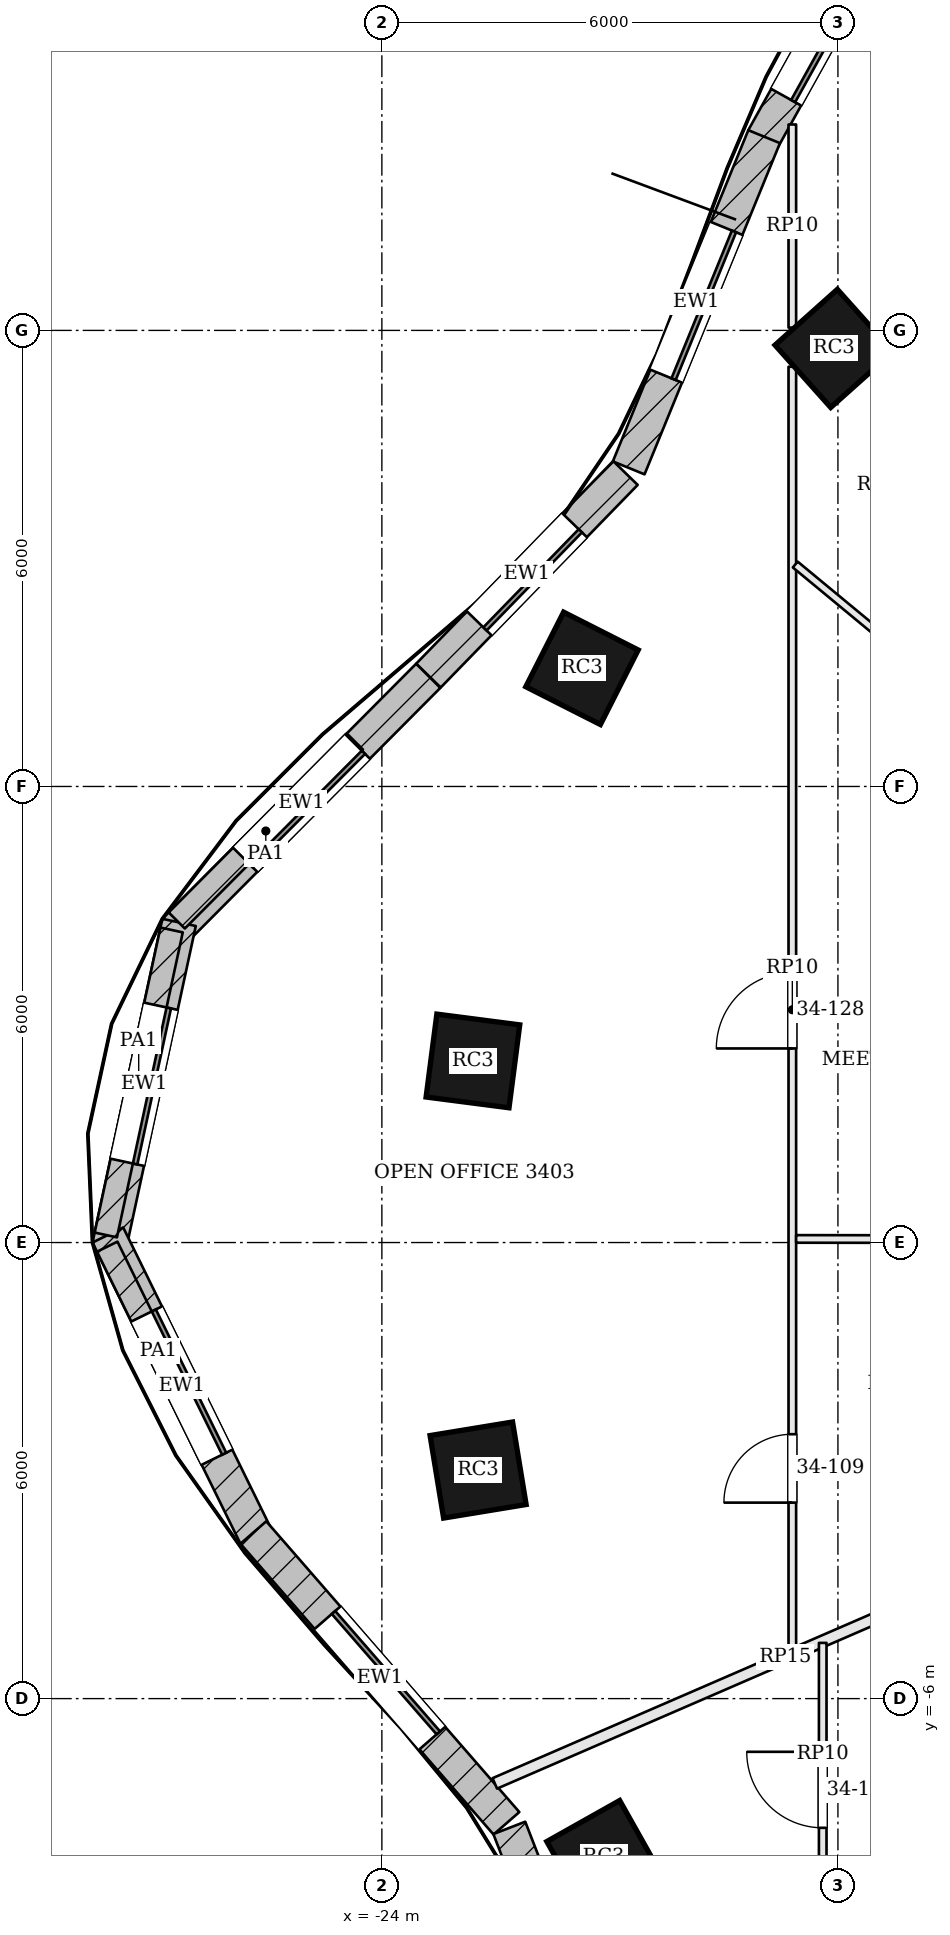
"""IFC4 building model, lengths in metres.
Left out: names, types, materials, properties, quantities, classifications, styles, units other than length and angle.
Written with IfcOpenShell. Run it as: python <this file> out.ifc"""

import sys

from ifc_helpers import new_model, si_unit, direction, frame, frame_2d, origin, origin_2d, place, context, subcontext, project, spatial, rectangle, extrude, element, fill, save


model = new_model("IFC4")
c1 = context("Model", 3, precision=1e-05, world=origin(), true_north=direction((0.0, 1.0)))
c2 = subcontext(c1, "Body", "Model", "MODEL_VIEW")
j1 = project(units=[si_unit("LENGTHUNIT", "METRE"), si_unit("PLANEANGLEUNIT", "RADIAN")], contexts=[c1])
p1 = place(None, origin())
s1 = spatial("IfcSite", under=j1, at=p1, CompositionType="ELEMENT")
p2 = place(p1, origin())
s2 = spatial("IfcBuilding", under=s1, at=p2, CompositionType="ELEMENT")
p3 = place(p2, frame((0.0, 0.0, 142.2)))
s3 = spatial("IfcBuildingStorey", under=s2, at=p3, CompositionType="ELEMENT", Elevation=142.2)
for number, where, z_axis, x_axis in (
    (1, (-18.051, 11.763, 0.0), (0.0, 0.0, 1.0), (-0.746, -0.666, 0.0)),
    (2, (-21.367, 7.554, 0.0), (0.0, 0.0, 1.0), (-0.452, -0.892, 0.0)),
    (3, (-22.802, 2.389, 0.0), (0.0, 0.0, 1.0), (-0.129, -0.992, 0.0)),
    (4, (-22.734, -2.993, 0.0), (0.0, 0.0, 1.0), (0.162, -0.987, 0.0)),
    (5, (-21.081, -8.09, 0.0), (0.0, 0.0, 1.0), (0.49, -0.872, 0.0)),
):
    element("IfcColumn", number, at=place(p3, frame(where, z_axis=z_axis, x_axis=x_axis)), inside=s3, PredefinedType="COLUMN", context=c2, shape_type="SweptSolid", body=[
        extrude(rectangle(XDim=1.1, YDim=1.1, at=origin_2d()), origin(), (0.0, 0.0, 1.0), 3.9),
    ])
p4 = place(p3, frame((-17.359, 17.447, 0.0), z_axis=(0.0, 0.0, 1.0), x_axis=(-0.485618126214, -0.874171056197, 0.0)))
e6 = element("IfcWall", 6, at=p4, inside=s3, PredefinedType="SOLIDWALL", context=c2, shape_type="SweptSolid", body=[
    extrude(rectangle(XDim=3.343, YDim=0.45, at=frame_2d((1.671, 0.0))), origin(), (0.0, 0.0, 1.0), 3.7),
])
p5 = place(p4, frame((0.621, 0.0, 0.9)))
e7 = element("IfcOpeningElement", 7, at=p5, cuts=e6, PredefinedType="OPENING", context=c2, shape_type="SweptSolid", body=[
    extrude(rectangle(XDim=2.1, YDim=2.3, at=frame_2d((1.05, 1.15))), frame((0.0, 0.235, 0.0), z_axis=(0.0, -1.0, 0.0), x_axis=(1.0, 0.0, 0.0)), (0.0, 0.0, 1.0), 0.47),
])
p6 = place(p3, frame((-18.971, 14.549, 0.0), z_axis=(0.0, 0.0, 1.0), x_axis=(-0.378434936431, -0.925627894398, 0.0)))
e8 = element("IfcWall", 8, at=p6, inside=s3, PredefinedType="SOLIDWALL", context=c2, shape_type="SweptSolid", body=[
    extrude(rectangle(XDim=4.708, YDim=0.45, at=frame_2d((2.354, 0.0))), origin(), (0.0, 0.0, 1.0), 3.7),
])
p7 = place(p6, frame((1.304, 0.0, 0.9)))
e9 = element("IfcOpeningElement", 9, at=p7, cuts=e8, PredefinedType="OPENING", context=c2, shape_type="SweptSolid", body=[
    extrude(rectangle(XDim=2.1, YDim=2.3, at=frame_2d((1.05, 1.15))), frame((0.0, 0.235, 0.0), z_axis=(0.0, -1.0, 0.0), x_axis=(1.0, 0.0, 0.0)), (0.0, 0.0, 1.0), 0.47),
])
p8 = place(p3, frame((-20.796, 10.124, 0.0), z_axis=(0.0, 0.0, 1.0), x_axis=(-0.697121527554, -0.716952980203, 0.0)))
e10 = element("IfcWall", 10, at=p8, inside=s3, PredefinedType="SOLIDWALL", context=c2, shape_type="SweptSolid", body=[
    extrude(rectangle(XDim=3.718, YDim=0.45, at=frame_2d((1.859, 0.0))), origin(), (0.0, 0.0, 1.0), 3.7),
])
p9 = place(p8, frame((0.959, 0.0, 0.9)))
e11 = element("IfcOpeningElement", 11, at=p9, cuts=e10, PredefinedType="OPENING", context=c2, shape_type="SweptSolid", body=[
    extrude(rectangle(XDim=1.8, YDim=2.3, at=frame_2d((0.9, 1.15))), frame((0.0, 0.235, 0.0), z_axis=(0.0, -1.0, 0.0), x_axis=(1.0, 0.0, 0.0)), (0.0, 0.0, 1.0), 0.47),
])
p10 = place(p3, frame((-23.39, 7.456, 0.0), z_axis=(0.0, 0.0, 1.0), x_axis=(-0.705349231702, -0.708859973011, 0.0)))
e12 = element("IfcWall", 12, at=p10, inside=s3, PredefinedType="SOLIDWALL", context=c2, shape_type="SweptSolid", body=[
    extrude(rectangle(XDim=4.729, YDim=0.45, at=frame_2d((2.364, 0.0))), origin(), (0.0, 0.0, 1.0), 3.7),
])
p11 = place(p10, frame((1.314, 0.0, 0.9)))
e13 = element("IfcOpeningElement", 13, at=p11, cuts=e12, PredefinedType="OPENING", context=c2, shape_type="SweptSolid", body=[
    extrude(rectangle(XDim=2.1, YDim=2.3, at=frame_2d((1.05, 1.15))), frame((0.0, 0.235, 0.0), z_axis=(0.0, -1.0, 0.0), x_axis=(1.0, 0.0, 0.0)), (0.0, 0.0, 1.0), 0.47),
])
p12 = place(p3, frame((-26.668, 4.211, 0.0), z_axis=(0.0, 0.0, 1.0), x_axis=(-0.210910311825, -0.977505417052, 0.0)))
e14 = element("IfcWall", 14, at=p12, inside=s3, PredefinedType="SOLIDWALL", context=c2, shape_type="SweptSolid", body=[
    extrude(rectangle(XDim=4.357, YDim=0.45, at=frame_2d((2.178, 0.0))), origin(), (0.0, 0.0, 1.0), 3.7),
])
p13 = place(p12, frame((1.128, 0.0, 0.9)))
e15 = element("IfcOpeningElement", 15, at=p13, cuts=e14, PredefinedType="OPENING", context=c2, shape_type="SweptSolid", body=[
    extrude(rectangle(XDim=2.1, YDim=2.3, at=frame_2d((1.05, 1.15))), frame((0.0, 0.235, 0.0), z_axis=(0.0, -1.0, 0.0), x_axis=(1.0, 0.0, 0.0)), (0.0, 0.0, 1.0), 0.47),
])
p14 = place(p3, frame((-27.605, 0.099, 0.0), z_axis=(0.0, 0.0, 1.0), x_axis=(0.440876526139, -0.897567762734, 0.0)))
e16 = element("IfcWall", 16, at=p14, inside=s3, PredefinedType="SOLIDWALL", context=c2, shape_type="SweptSolid", body=[
    extrude(rectangle(XDim=4.415, YDim=0.45, at=frame_2d((2.208, 0.0))), origin(), (0.0, 0.0, 1.0), 3.7),
])
p15 = place(p14, frame((1.158, 0.0, 0.9)))
e17 = element("IfcOpeningElement", 17, at=p15, cuts=e16, PredefinedType="OPENING", context=c2, shape_type="SweptSolid", body=[
    extrude(rectangle(XDim=2.1, YDim=2.3, at=frame_2d((1.05, 1.15))), frame((0.0, 0.235, 0.0), z_axis=(0.0, -1.0, 0.0), x_axis=(1.0, 0.0, 0.0)), (0.0, 0.0, 1.0), 0.47),
])
p16 = place(p3, frame((-25.691, -3.815, 0.0), z_axis=(0.0, 0.0, 1.0), x_axis=(0.656552883353, -0.754279995334, 0.0)))
e18 = element("IfcWall", 18, at=p16, inside=s3, PredefinedType="SOLIDWALL", context=c2, shape_type="SweptSolid", body=[
    extrude(rectangle(XDim=5.071, YDim=0.45, at=frame_2d((2.536, 0.0))), origin(), (0.0, 0.0, 1.0), 3.7),
])
p17 = place(p16, frame((1.486, 0.0, 0.9)))
e19 = element("IfcOpeningElement", 19, at=p17, cuts=e18, PredefinedType="OPENING", context=c2, shape_type="SweptSolid", body=[
    extrude(rectangle(XDim=2.1, YDim=2.3, at=frame_2d((1.05, 1.15))), frame((0.0, 0.235, 0.0), z_axis=(0.0, -1.0, 0.0), x_axis=(1.0, 0.0, 0.0)), (0.0, 0.0, 1.0), 0.47),
])
p18 = place(p3, frame((-22.323, -7.701, 0.0), z_axis=(0.0, 0.0, 1.0), x_axis=(0.361550075906, -0.932352692178, 0.0)))
e20 = element("IfcWall", 20, at=p18, inside=s3, PredefinedType="SOLIDWALL", context=c2, shape_type="SweptSolid", body=[
    extrude(rectangle(XDim=3.313, YDim=0.45, at=frame_2d((1.657, 0.0))), origin(), (0.0, 0.0, 1.0), 3.7),
])
p19 = place(p18, frame((0.607, 0.0, 0.9)))
e21 = element("IfcOpeningElement", 21, at=p19, cuts=e20, PredefinedType="OPENING", context=c2, shape_type="SweptSolid", body=[
    extrude(rectangle(XDim=2.1, YDim=2.3, at=frame_2d((1.05, 1.15))), frame((0.0, 0.235, 0.0), z_axis=(0.0, -1.0, 0.0), x_axis=(1.0, 0.0, 0.0)), (0.0, 0.0, 1.0), 0.47),
])
p20 = place(p3, frame((-24.355, 6.592, 3.9), z_axis=(0.0, 0.0, 1.0), x_axis=(-0.705340861985, -0.708868301178, 0.0)))
e22 = element("IfcWall", 22, at=p20, inside=s3, PredefinedType="PARAPET", context=c2, shape_type="SweptSolid", body=[
    extrude(rectangle(XDim=3.322, YDim=0.3, at=frame_2d((1.661, 0.0))), origin(), (0.0, 0.0, 1.0), 1.1),
])
p21 = place(p3, frame((-26.766, 4.112, 3.9), z_axis=(0.0, 0.0, 1.0), x_axis=(-0.210962679137, -0.977494116612, 0.0)))
e23 = element("IfcWall", 23, at=p21, inside=s3, PredefinedType="PARAPET", context=c2, shape_type="SweptSolid", body=[
    extrude(rectangle(XDim=4.105, YDim=0.3, at=frame_2d((2.052, 0.0))), origin(), (0.0, 0.0, 1.0), 1.1),
])
p22 = place(p3, frame((-27.613, -0.054, 3.9), z_axis=(0.0, 0.0, 1.0), x_axis=(0.440943372438, -0.897534925394, 0.0)))
e24 = element("IfcWall", 24, at=p22, inside=s3, PredefinedType="PARAPET", context=c2, shape_type="SweptSolid", body=[
    extrude(rectangle(XDim=3.058, YDim=0.3, at=frame_2d((1.529, 0.0))), origin(), (0.0, 0.0, 1.0), 1.1),
])
p23 = place(p3, frame((-22.514, -7.116, 0.0), z_axis=(0.0, 0.0, 1.0), x_axis=(0.917457618692, 0.397833530392, 0.0)))
e25 = element("IfcWall", 25, at=p23, inside=s3, PredefinedType="PARTITIONING", context=c2, shape_type="SweptSolid", body=[
    extrude(rectangle(XDim=8.333, YDim=0.15, at=frame_2d((4.167, 0.0))), origin(), (0.0, 0.0, 1.0), 3.198),
])
p24 = place(p3, frame((-18.6, -5.397, 0.0), z_axis=(0.0, 0.0, 1.0), x_axis=(0.0, 1.0, 0.0)))
e26 = element("IfcWall", 26, at=p24, inside=s3, PredefinedType="PARTITIONING", context=c2, shape_type="SweptSolid", body=[
    extrude(rectangle(XDim=16.919, YDim=0.1, at=frame_2d((8.459, 0.0))), origin(), (0.0, 0.0, 1.0), 3.184),
])
p25 = place(p24, frame((1.975, 0.0, 0.0)))
e27 = element("IfcOpeningElement", 27, at=p25, cuts=e26, PredefinedType="OPENING", context=c2, shape_type="SweptSolid", body=[
    extrude(rectangle(XDim=0.9, YDim=2.1, at=frame_2d((0.45, 1.05))), frame((0.0, 0.06, 0.0), z_axis=(0.0, -1.0, 0.0), x_axis=(1.0, 0.0, 0.0)), (0.0, 0.0, 1.0), 0.12),
])
p26 = place(p24, frame((7.95, 0.0, 0.0)))
e28 = element("IfcOpeningElement", 28, at=p26, cuts=e26, PredefinedType="OPENING", context=c2, shape_type="SweptSolid", body=[
    extrude(rectangle(XDim=1.0, YDim=2.4, at=frame_2d((0.5, 1.2))), frame((0.0, 0.06, 0.0), z_axis=(0.0, -1.0, 0.0), x_axis=(1.0, 0.0, 0.0)), (0.0, 0.0, 1.0), 0.12),
])
p27 = place(p3, frame((-18.6, 12.037, 0.0), z_axis=(0.0, 0.0, 1.0), x_axis=(0.0, 1.0, 0.0)))
e29 = element("IfcWall", 29, at=p27, inside=s3, PredefinedType="PARTITIONING", context=c2, shape_type="SweptSolid", body=[
    extrude(rectangle(XDim=2.672, YDim=0.1, at=frame_2d((1.336, 0.0))), origin(), (0.0, 0.0, 1.0), 3.184),
])
p28 = place(p3, frame((-14.858, 5.857, 0.0), z_axis=(0.0, 0.0, 1.0), x_axis=(-0.770605931108, 0.637311932213, 0.0)))
e30 = element("IfcWall", 30, at=p28, inside=s3, PredefinedType="PARTITIONING", context=c2, shape_type="SweptSolid", body=[
    extrude(rectangle(XDim=4.806, YDim=0.1, at=frame_2d((2.403, 0.0))), origin(), (0.0, 0.0, 1.0), 3.184),
])
p29 = place(p3, frame((-14.875, 0.043, 0.0), z_axis=(0.0, 0.0, 1.0), x_axis=(-0.999999285062, 0.001195774074, 0.0)))
e31 = element("IfcWall", 31, at=p29, inside=s3, PredefinedType="PARTITIONING", context=c2, shape_type="SweptSolid", body=[
    extrude(rectangle(XDim=3.675, YDim=0.1, at=frame_2d((1.837, 0.0))), origin(), (0.0, 0.0, 1.0), 3.184),
])
p30 = place(p3, frame((-18.2, -8.2, 0.0), z_axis=(0.0, 0.0, 1.0), x_axis=(0.0, 1.0, 0.0)))
e32 = element("IfcWall", 32, at=p30, inside=s3, PredefinedType="PARTITIONING", context=c2, shape_type="SweptSolid", body=[
    extrude(rectangle(XDim=2.933, YDim=0.1, at=frame_2d((1.467, 0.0))), origin(), (0.0, 0.0, 1.0), 3.184),
])
p31 = place(p30, frame((0.5, 0.0, 0.0)))
e33 = element("IfcOpeningElement", 33, at=p31, cuts=e32, PredefinedType="OPENING", context=c2, shape_type="SweptSolid", body=[
    extrude(rectangle(XDim=1.0, YDim=2.1, at=frame_2d((0.5, 1.05))), frame((0.0, 0.06, 0.0), z_axis=(0.0, -1.0, 0.0), x_axis=(1.0, 0.0, 0.0)), (0.0, 0.0, 1.0), 0.12),
])
p32 = place(p5, origin())
e34 = element("IfcWindow", 34, at=p32, inside=s3, PartitioningType="SINGLE_PANEL", PredefinedType="WINDOW", context=c2, shape_type="SweptSolid", body=[
    extrude(rectangle(XDim=2.1, YDim=2.3, at=frame_2d((1.05, 1.15))), frame((0.0, 0.135, 0.0), z_axis=(0.0, -1.0, 0.0), x_axis=(1.0, 0.0, 0.0)), (0.0, 0.0, 1.0), 0.06),
])
fill(e7, e34)
p33 = place(p7, origin())
e35 = element("IfcWindow", 35, at=p33, inside=s3, PartitioningType="SINGLE_PANEL", PredefinedType="WINDOW", context=c2, shape_type="SweptSolid", body=[
    extrude(rectangle(XDim=2.1, YDim=2.3, at=frame_2d((1.05, 1.15))), frame((0.0, 0.135, 0.0), z_axis=(0.0, -1.0, 0.0), x_axis=(1.0, 0.0, 0.0)), (0.0, 0.0, 1.0), 0.06),
])
fill(e9, e35)
p34 = place(p9, origin())
e36 = element("IfcWindow", 36, at=p34, inside=s3, PartitioningType="SINGLE_PANEL", PredefinedType="WINDOW", context=c2, shape_type="SweptSolid", body=[
    extrude(rectangle(XDim=1.8, YDim=2.3, at=frame_2d((0.9, 1.15))), frame((0.0, 0.135, 0.0), z_axis=(0.0, -1.0, 0.0), x_axis=(1.0, 0.0, 0.0)), (0.0, 0.0, 1.0), 0.06),
])
fill(e11, e36)
p35 = place(p11, origin())
e37 = element("IfcWindow", 37, at=p35, inside=s3, PartitioningType="SINGLE_PANEL", PredefinedType="WINDOW", context=c2, shape_type="SweptSolid", body=[
    extrude(rectangle(XDim=2.1, YDim=2.3, at=frame_2d((1.05, 1.15))), frame((0.0, 0.135, 0.0), z_axis=(0.0, -1.0, 0.0), x_axis=(1.0, 0.0, 0.0)), (0.0, 0.0, 1.0), 0.06),
])
fill(e13, e37)
p36 = place(p13, origin())
e38 = element("IfcWindow", 38, at=p36, inside=s3, PartitioningType="SINGLE_PANEL", PredefinedType="WINDOW", context=c2, shape_type="SweptSolid", body=[
    extrude(rectangle(XDim=2.1, YDim=2.3, at=frame_2d((1.05, 1.15))), frame((0.0, 0.135, 0.0), z_axis=(0.0, -1.0, 0.0), x_axis=(1.0, 0.0, 0.0)), (0.0, 0.0, 1.0), 0.06),
])
fill(e15, e38)
p37 = place(p15, origin())
e39 = element("IfcWindow", 39, at=p37, inside=s3, PartitioningType="SINGLE_PANEL", PredefinedType="WINDOW", context=c2, shape_type="SweptSolid", body=[
    extrude(rectangle(XDim=2.1, YDim=2.3, at=frame_2d((1.05, 1.15))), frame((0.0, 0.135, 0.0), z_axis=(0.0, -1.0, 0.0), x_axis=(1.0, 0.0, 0.0)), (0.0, 0.0, 1.0), 0.06),
])
fill(e17, e39)
p38 = place(p17, origin())
e40 = element("IfcWindow", 40, at=p38, inside=s3, PartitioningType="SINGLE_PANEL", PredefinedType="WINDOW", context=c2, shape_type="SweptSolid", body=[
    extrude(rectangle(XDim=2.1, YDim=2.3, at=frame_2d((1.05, 1.15))), frame((0.0, 0.135, 0.0), z_axis=(0.0, -1.0, 0.0), x_axis=(1.0, 0.0, 0.0)), (0.0, 0.0, 1.0), 0.06),
])
fill(e19, e40)
p39 = place(p25, origin())
e41 = element("IfcDoor", 41, at=p39, inside=s3, OperationType="SINGLE_SWING_LEFT", PredefinedType="DOOR", context=c2, shape_type="SweptSolid", body=[
    extrude(rectangle(XDim=0.9, YDim=2.1, at=frame_2d((0.45, 1.05))), frame((0.0, 0.025, 0.0), z_axis=(0.0, -1.0, 0.0), x_axis=(1.0, 0.0, 0.0)), (0.0, 0.0, 1.0), 0.05),
])
fill(e27, e41)
p40 = place(p31, origin())
e42 = element("IfcDoor", 42, at=p40, inside=s3, OperationType="SINGLE_SWING_RIGHT", PredefinedType="DOOR", context=c2, shape_type="SweptSolid", body=[
    extrude(rectangle(XDim=1.0, YDim=2.1, at=frame_2d((0.5, 1.05))), frame((0.0, 0.025, 0.0), z_axis=(0.0, -1.0, 0.0), x_axis=(1.0, 0.0, 0.0)), (0.0, 0.0, 1.0), 0.05),
])
fill(e33, e42)
p41 = place(p26, origin())
e43 = element("IfcDoor", 43, at=p41, inside=s3, OperationType="SINGLE_SWING_LEFT", PredefinedType="DOOR", context=c2, shape_type="SweptSolid", body=[
    extrude(rectangle(XDim=1.0, YDim=2.4, at=frame_2d((0.5, 1.2))), frame((0.0, 0.025, 0.0), z_axis=(0.0, -1.0, 0.0), x_axis=(1.0, 0.0, 0.0)), (0.0, 0.0, 1.0), 0.05),
])
fill(e28, e43)
save(model, sys.argv[1])
